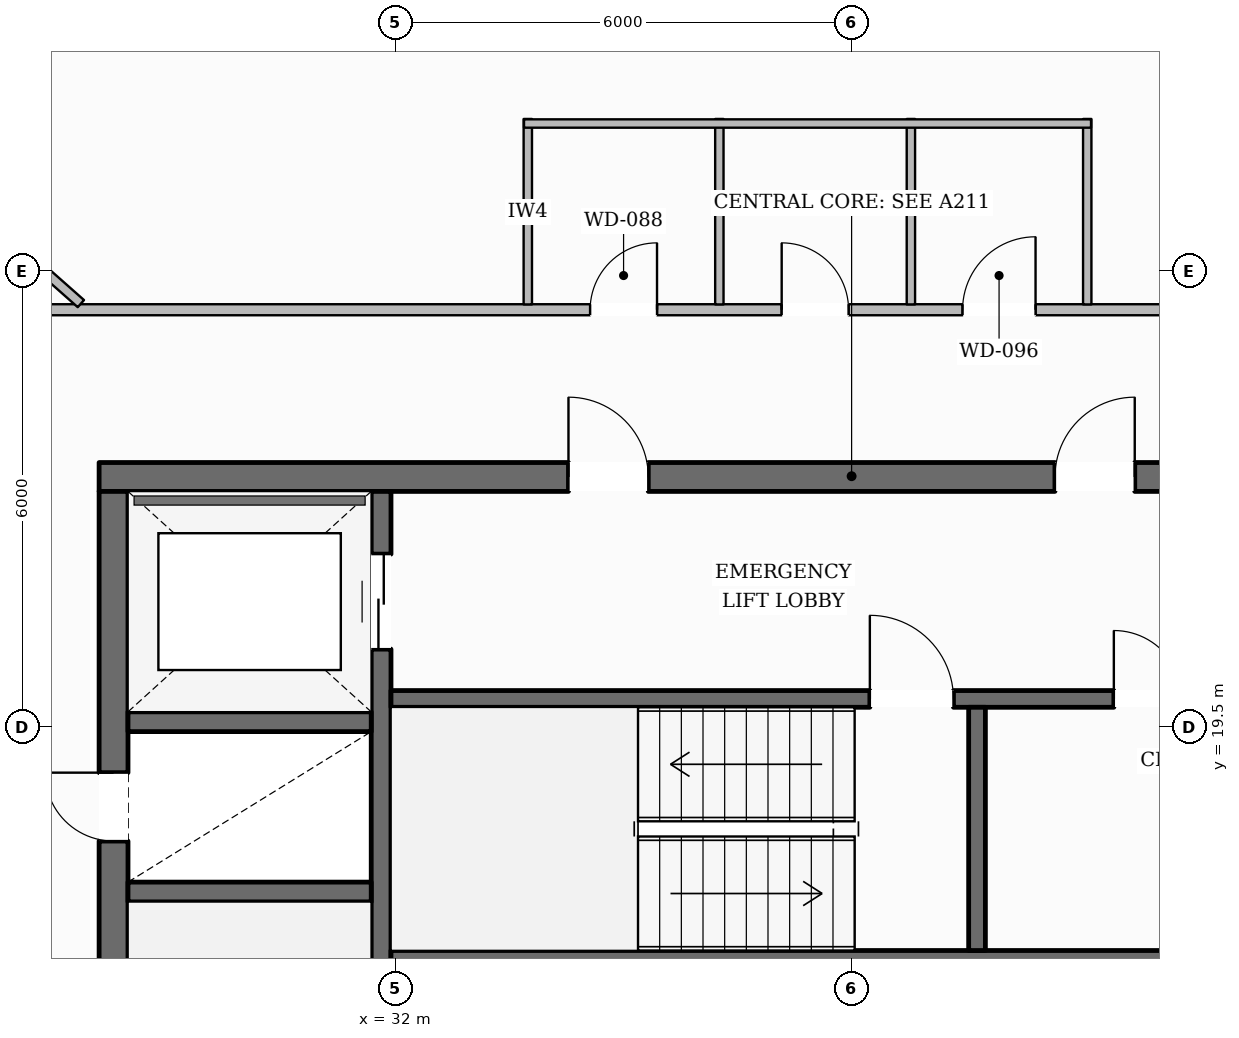
"""IFC4 building model, lengths in metres.
Left out: names, types, materials, properties, quantities, classifications, styles, units other than length and angle.
Written with IfcOpenShell. Run it as: python <this file> out.ifc"""

import sys

from ifc_helpers import new_model, si_unit, direction, frame, frame_2d, origin, place, context, subcontext, project, spatial, rectangle, extrude, element, fill, save


model = new_model("IFC4")
c1 = context("Model", 3, precision=1e-05, world=origin(), true_north=direction((0.0, 1.0)))
c2 = subcontext(c1, "Body", "Model", "MODEL_VIEW")
j1 = project(units=[si_unit("LENGTHUNIT", "METRE"), si_unit("PLANEANGLEUNIT", "RADIAN")], contexts=[c1])
p1 = place(None, origin())
s1 = spatial("IfcSite", under=j1, at=p1, CompositionType="ELEMENT")
p2 = place(p1, origin())
s2 = spatial("IfcBuilding", under=s1, at=p2, CompositionType="ELEMENT")
p3 = place(p2, frame((0.0, 0.0, 293.4)))
s3 = spatial("IfcBuildingStorey", under=s2, at=p3, CompositionType="ELEMENT", Elevation=293.4)
p4 = place(p3, frame((28.1, 22.79, 0.0), z_axis=(0.0, 0.0, 1.0), x_axis=(1.0, 0.0, 0.0)))
e1 = element("IfcWall", 1, at=p4, inside=s3, PredefinedType="SOLIDWALL", context=c2, shape_type="SweptSolid", body=[
    extrude(rectangle(XDim=19.8, YDim=0.38, at=frame_2d((9.9, 0.0))), origin(), (0.0, 0.0, 1.0), 3.61),
])
p5 = place(p4, frame((6.175, 0.0, 0.0)))
e2 = element("IfcOpeningElement", 2, at=p5, cuts=e1, PredefinedType="OPENING", context=c2, shape_type="SweptSolid", body=[
    extrude(rectangle(XDim=1.05, YDim=2.15, at=frame_2d((0.525, 1.075))), frame((0.0, 0.2, 0.0), z_axis=(0.0, -1.0, 0.0), x_axis=(1.0, 0.0, 0.0)), (0.0, 0.0, 1.0), 0.4),
])
p6 = place(p4, frame((12.575, 0.0, 0.0)))
e3 = element("IfcOpeningElement", 3, at=p6, cuts=e1, PredefinedType="OPENING", context=c2, shape_type="SweptSolid", body=[
    extrude(rectangle(XDim=1.05, YDim=2.15, at=frame_2d((0.525, 1.075))), frame((0.0, 0.2, 0.0), z_axis=(0.0, -1.0, 0.0), x_axis=(1.0, 0.0, 0.0)), (0.0, 0.0, 1.0), 0.4),
])
p7 = place(p3, frame((28.29, 9.6, 0.0), z_axis=(0.0, 0.0, 1.0), x_axis=(0.0, 1.0, 0.0)))
e4 = element("IfcWall", 4, at=p7, inside=s3, PredefinedType="SOLIDWALL", context=c2, shape_type="SweptSolid", body=[
    extrude(rectangle(XDim=13.0, YDim=0.38, at=frame_2d((6.5, 0.0))), origin(), (0.0, 0.0, 1.0), 3.61),
])
p8 = place(p7, frame((0.2, 0.0, 0.0)))
e5 = element("IfcOpeningElement", 5, at=p8, cuts=e4, PredefinedType="OPENING", context=c2, shape_type="SweptSolid", body=[
    extrude(rectangle(XDim=1.1, YDim=2.15, at=frame_2d((0.55, 1.075))), frame((0.0, 0.2, 0.0), z_axis=(0.0, -1.0, 0.0), x_axis=(1.0, 0.0, 0.0)), (0.0, 0.0, 1.0), 0.4),
])
p9 = place(p7, frame((8.4, 0.0, 0.0)))
e6 = element("IfcOpeningElement", 6, at=p9, cuts=e4, PredefinedType="OPENING", context=c2, shape_type="SweptSolid", body=[
    extrude(rectangle(XDim=0.9, YDim=2.1, at=frame_2d((0.45, 1.05))), frame((0.0, 0.2, 0.0), z_axis=(0.0, -1.0, 0.0), x_axis=(1.0, 0.0, 0.0)), (0.0, 0.0, 1.0), 0.4),
])
p10 = place(p3, frame((31.81, 9.6, 0.0), z_axis=(0.0, 0.0, 1.0), x_axis=(0.0, 1.0, 0.0)))
e7 = element("IfcWall", 7, at=p10, inside=s3, PredefinedType="SHEAR", context=c2, shape_type="SweptSolid", body=[
    extrude(rectangle(XDim=13.0, YDim=0.26, at=frame_2d((6.5, 0.0))), origin(), (0.0, 0.0, 1.0), 3.61),
])
p11 = place(p10, frame((10.925, 0.0, 0.0)))
e8 = element("IfcOpeningElement", 8, at=p11, cuts=e7, PredefinedType="OPENING", context=c2, shape_type="SweptSolid", body=[
    extrude(rectangle(XDim=1.25, YDim=2.25, at=frame_2d((0.625, 1.125))), frame((0.0, 0.14, 0.0), z_axis=(0.0, -1.0, 0.0), x_axis=(1.0, 0.0, 0.0)), (0.0, 0.0, 1.0), 0.28),
])
for number, where, z_axis, x_axis in (
    (9, (28.48, 17.33, 0.0), (0.0, 0.0, 1.0), (1.0, 0.0, 0.0)),
    (10, (28.48, 19.57, 0.0), (0.0, 0.0, 1.0), (1.0, 0.0, 0.0)),
):
    element("IfcWall", number, at=place(p3, frame(where, z_axis=z_axis, x_axis=x_axis)), inside=s3, PredefinedType="SHEAR", context=c2, shape_type="SweptSolid", body=[
        extrude(rectangle(XDim=3.2, YDim=0.26, at=frame_2d((1.6, 0.0))), origin(), (0.0, 0.0, 1.0), 3.61),
    ])
p12 = place(p3, frame((31.94, 19.87, 0.0), z_axis=(0.0, 0.0, 1.0), x_axis=(1.0, 0.0, 0.0)))
e11 = element("IfcWall", 11, at=p12, inside=s3, PredefinedType="SOLIDWALL", context=c2, shape_type="SweptSolid", body=[
    extrude(rectangle(XDim=12.12, YDim=0.22, at=frame_2d((6.06, 0.0))), origin(), (0.0, 0.0, 1.0), 3.61),
])
p13 = place(p12, frame((6.3, 0.0, 0.0)))
e12 = element("IfcOpeningElement", 12, at=p13, cuts=e11, PredefinedType="OPENING", context=c2, shape_type="SweptSolid", body=[
    extrude(rectangle(XDim=1.1, YDim=2.15, at=frame_2d((0.55, 1.075))), frame((0.0, 0.12, 0.0), z_axis=(0.0, -1.0, 0.0), x_axis=(1.0, 0.0, 0.0)), (0.0, 0.0, 1.0), 0.24),
])
p14 = place(p12, frame((9.51, 0.0, 0.0)))
e13 = element("IfcOpeningElement", 13, at=p14, cuts=e11, PredefinedType="OPENING", context=c2, shape_type="SweptSolid", body=[
    extrude(rectangle(XDim=0.9, YDim=2.1, at=frame_2d((0.45, 1.05))), frame((0.0, 0.12, 0.0), z_axis=(0.0, -1.0, 0.0), x_axis=(1.0, 0.0, 0.0)), (0.0, 0.0, 1.0), 0.24),
])
p15 = place(p3, frame((31.94, 16.45, 0.0), z_axis=(0.0, 0.0, 1.0), x_axis=(1.0, 0.0, 0.0)))
e14 = element("IfcWall", 14, at=p15, inside=s3, PredefinedType="SOLIDWALL", context=c2, shape_type="SweptSolid", body=[
    extrude(rectangle(XDim=12.12, YDim=0.22, at=frame_2d((6.06, 0.0))), origin(), (0.0, 0.0, 1.0), 3.61),
])
p16 = place(p3, frame((39.65, 16.56, 0.0), z_axis=(0.0, 0.0, 1.0), x_axis=(0.0, 1.0, 0.0)))
e15 = element("IfcWall", 15, at=p16, inside=s3, PredefinedType="SOLIDWALL", context=c2, shape_type="SweptSolid", body=[
    extrude(rectangle(XDim=3.2, YDim=0.22, at=frame_2d((1.6, 0.0))), origin(), (0.0, 0.0, 1.0), 3.61),
])
p17 = place(p3, frame((15.381, 10.05, 0.0), z_axis=(0.0, 0.0, 1.0), x_axis=(0.501350047618, 0.865244549104, 0.0)))
e16 = element("IfcWall", 16, at=p17, inside=s3, PredefinedType="STANDARD", context=c2, shape_type="SweptSolid", body=[
    extrude(rectangle(XDim=39.715, YDim=0.35, at=frame_2d((19.857, 0.0))), origin(), (0.0, 0.0, 1.0), 3.196),
])
p18 = place(p17, frame((9.529, 0.0, 0.0)))
e17 = element("IfcOpeningElement", 17, at=p18, cuts=e16, PredefinedType="OPENING", context=c2, shape_type="SweptSolid", body=[
    extrude(rectangle(XDim=1.0, YDim=2.2, at=frame_2d((0.5, 1.1))), frame((0.0, 0.185, 0.0), z_axis=(0.0, -1.0, 0.0), x_axis=(1.0, 0.0, 0.0)), (0.0, 0.0, 1.0), 0.37),
])
p19 = place(p17, frame((35.336, 0.0, 0.65)))
e18 = element("IfcOpeningElement", 18, at=p19, cuts=e16, PredefinedType="OPENING", context=c2, shape_type="SweptSolid", body=[
    extrude(rectangle(XDim=1.35, YDim=1.75, at=frame_2d((0.675, 0.875))), frame((0.0, 0.185, 0.0), z_axis=(0.0, -1.0, 0.0), x_axis=(1.0, 0.0, 0.0)), (0.0, 0.0, 1.0), 0.37),
])
p20 = place(p17, frame((28.875, 0.0, 0.65)))
e19 = element("IfcOpeningElement", 19, at=p20, cuts=e16, PredefinedType="OPENING", context=c2, shape_type="SweptSolid", body=[
    extrude(rectangle(XDim=1.35, YDim=1.75, at=frame_2d((0.675, 0.875))), frame((0.0, 0.185, 0.0), z_axis=(0.0, -1.0, 0.0), x_axis=(1.0, 0.0, 0.0)), (0.0, 0.0, 1.0), 0.37),
])
p21 = place(p17, frame((22.414, 0.0, 0.65)))
e20 = element("IfcOpeningElement", 20, at=p21, cuts=e16, PredefinedType="OPENING", context=c2, shape_type="SweptSolid", body=[
    extrude(rectangle(XDim=1.35, YDim=1.75, at=frame_2d((0.675, 0.875))), frame((0.0, 0.185, 0.0), z_axis=(0.0, -1.0, 0.0), x_axis=(1.0, 0.0, 0.0)), (0.0, 0.0, 1.0), 0.37),
])
p22 = place(p17, frame((3.03, 0.0, 0.65)))
e21 = element("IfcOpeningElement", 21, at=p22, cuts=e16, PredefinedType="OPENING", context=c2, shape_type="SweptSolid", body=[
    extrude(rectangle(XDim=1.35, YDim=1.75, at=frame_2d((0.675, 0.875))), frame((0.0, 0.185, 0.0), z_axis=(0.0, -1.0, 0.0), x_axis=(1.0, 0.0, 0.0)), (0.0, 0.0, 1.0), 0.37),
])
p23 = place(p3, frame((40.595, 44.482, 0.0), z_axis=(0.0, 0.0, 1.0), x_axis=(0.491607932601, -0.870816651543, 0.0)))
e22 = element("IfcWall", 22, at=p23, inside=s3, PredefinedType="STANDARD", context=c2, shape_type="SweptSolid", body=[
    extrude(rectangle(XDim=38.965, YDim=0.35, at=frame_2d((19.482, 0.0))), origin(), (0.0, 0.0, 1.0), 3.196),
])
p24 = place(p23, frame((9.341, 0.0, 0.0)))
e23 = element("IfcOpeningElement", 23, at=p24, cuts=e22, PredefinedType="OPENING", context=c2, shape_type="SweptSolid", body=[
    extrude(rectangle(XDim=1.0, YDim=2.2, at=frame_2d((0.5, 1.1))), frame((0.0, 0.185, 0.0), z_axis=(0.0, -1.0, 0.0), x_axis=(1.0, 0.0, 0.0)), (0.0, 0.0, 1.0), 0.37),
])
p25 = place(p23, frame((34.648, 0.0, 0.65)))
e24 = element("IfcOpeningElement", 24, at=p25, cuts=e22, PredefinedType="OPENING", context=c2, shape_type="SweptSolid", body=[
    extrude(rectangle(XDim=1.35, YDim=1.75, at=frame_2d((0.675, 0.875))), frame((0.0, 0.185, 0.0), z_axis=(0.0, -1.0, 0.0), x_axis=(1.0, 0.0, 0.0)), (0.0, 0.0, 1.0), 0.37),
])
p26 = place(p23, frame((28.314, 0.0, 0.65)))
e25 = element("IfcOpeningElement", 25, at=p26, cuts=e22, PredefinedType="OPENING", context=c2, shape_type="SweptSolid", body=[
    extrude(rectangle(XDim=1.35, YDim=1.75, at=frame_2d((0.675, 0.875))), frame((0.0, 0.185, 0.0), z_axis=(0.0, -1.0, 0.0), x_axis=(1.0, 0.0, 0.0)), (0.0, 0.0, 1.0), 0.37),
])
p27 = place(p23, frame((21.979, 0.0, 0.65)))
e26 = element("IfcOpeningElement", 26, at=p27, cuts=e22, PredefinedType="OPENING", context=c2, shape_type="SweptSolid", body=[
    extrude(rectangle(XDim=1.35, YDim=1.75, at=frame_2d((0.675, 0.875))), frame((0.0, 0.185, 0.0), z_axis=(0.0, -1.0, 0.0), x_axis=(1.0, 0.0, 0.0)), (0.0, 0.0, 1.0), 0.37),
])
p28 = place(p23, frame((2.976, 0.0, 0.65)))
e27 = element("IfcOpeningElement", 27, at=p28, cuts=e22, PredefinedType="OPENING", context=c2, shape_type="SweptSolid", body=[
    extrude(rectangle(XDim=1.35, YDim=1.75, at=frame_2d((0.675, 0.875))), frame((0.0, 0.185, 0.0), z_axis=(0.0, -1.0, 0.0), x_axis=(1.0, 0.0, 0.0)), (0.0, 0.0, 1.0), 0.37),
])
p29 = place(p3, frame((26.09, 24.99, 0.0), z_axis=(0.0, 0.0, 1.0), x_axis=(1.0, 0.0, 0.0)))
e28 = element("IfcWall", 28, at=p29, inside=s3, PredefinedType="PARTITIONING", context=c2, shape_type="SweptSolid", body=[
    extrude(rectangle(XDim=17.11, YDim=0.145, at=frame_2d((8.555, 0.0))), origin(), (0.0, 0.0, 1.0), 3.61),
])
p30 = place(p29, frame((8.47, 0.0, 0.0)))
e29 = element("IfcOpeningElement", 29, at=p30, cuts=e28, PredefinedType="OPENING", context=c2, shape_type="SweptSolid", body=[
    extrude(rectangle(XDim=0.88, YDim=2.1, at=frame_2d((0.44, 1.05))), frame((0.0, 0.083, 0.0), z_axis=(0.0, -1.0, 0.0), x_axis=(1.0, 0.0, 0.0)), (0.0, 0.0, 1.0), 0.165),
])
p31 = place(p29, frame((10.99, 0.0, 0.0)))
e30 = element("IfcOpeningElement", 30, at=p31, cuts=e28, PredefinedType="OPENING", context=c2, shape_type="SweptSolid", body=[
    extrude(rectangle(XDim=0.88, YDim=2.1, at=frame_2d((0.44, 1.05))), frame((0.0, 0.083, 0.0), z_axis=(0.0, -1.0, 0.0), x_axis=(1.0, 0.0, 0.0)), (0.0, 0.0, 1.0), 0.165),
])
p32 = place(p29, frame((13.37, 0.0, 0.0)))
e31 = element("IfcOpeningElement", 31, at=p32, cuts=e28, PredefinedType="OPENING", context=c2, shape_type="SweptSolid", body=[
    extrude(rectangle(XDim=0.96, YDim=2.1, at=frame_2d((0.48, 1.05))), frame((0.0, 0.083, 0.0), z_axis=(0.0, -1.0, 0.0), x_axis=(1.0, 0.0, 0.0)), (0.0, 0.0, 1.0), 0.165),
])
for number, where, z_axis, x_axis in (
    (32, (33.74, 25.06, 0.0), (0.0, 0.0, 1.0), (0.0, 1.0, 0.0)),
    (33, (36.26, 25.06, 0.0), (0.0, 0.0, 1.0), (0.0, 1.0, 0.0)),
    (34, (38.78, 25.06, 0.0), (0.0, 0.0, 1.0), (0.0, 1.0, 0.0)),
    (35, (41.1, 25.06, 0.0), (0.0, 0.0, 1.0), (0.0, 1.0, 0.0)),
):
    element("IfcWall", number, at=place(p3, frame(where, z_axis=z_axis, x_axis=x_axis)), inside=s3, PredefinedType="PLUMBINGWALL", context=c2, shape_type="SweptSolid", body=[
        extrude(rectangle(XDim=2.44, YDim=0.11, at=frame_2d((1.22, 0.0))), origin(), (0.0, 0.0, 1.0), 3.61),
    ])
p33 = place(p3, frame((33.69, 27.44, 0.0), z_axis=(0.0, 0.0, 1.0), x_axis=(1.0, 0.0, 0.0)))
e36 = element("IfcWall", 36, at=p33, inside=s3, PredefinedType="PLUMBINGWALL", context=c2, shape_type="SweptSolid", body=[
    extrude(rectangle(XDim=7.46, YDim=0.11, at=frame_2d((3.73, 0.0))), origin(), (0.0, 0.0, 1.0), 3.61),
])
p34 = place(p3, frame((27.86, 25.071, 0.0), z_axis=(0.0, 0.0, 1.0), x_axis=(-0.748944260639, 0.662633001333, 0.0)))
e37 = element("IfcWall", 37, at=p34, inside=s3, PredefinedType="PARTITIONING", context=c2, shape_type="SweptSolid", body=[
    extrude(rectangle(XDim=2.673, YDim=0.125, at=frame_2d((1.336, 0.0))), origin(), (0.0, 0.0, 1.0), 3.61),
])
p35 = place(p13, origin())
e38 = element("IfcDoor", 38, at=p35, inside=s3, OperationType="SINGLE_SWING_LEFT", PredefinedType="DOOR", context=c2, shape_type="SweptSolid", body=[
    extrude(rectangle(XDim=1.1, YDim=2.15, at=frame_2d((0.55, 1.075))), frame((0.0, 0.025, 0.0), z_axis=(0.0, -1.0, 0.0), x_axis=(1.0, 0.0, 0.0)), (0.0, 0.0, 1.0), 0.05),
])
fill(e12, e38)
p36 = place(p9, origin())
e39 = element("IfcDoor", 39, at=p36, inside=s3, OperationType="SINGLE_SWING_RIGHT", PredefinedType="DOOR", context=c2, shape_type="SweptSolid", body=[
    extrude(rectangle(XDim=0.9, YDim=2.1, at=frame_2d((0.45, 1.05))), frame((0.0, 0.025, 0.0), z_axis=(0.0, -1.0, 0.0), x_axis=(1.0, 0.0, 0.0)), (0.0, 0.0, 1.0), 0.05),
])
fill(e6, e39)
p37 = place(p5, origin())
e40 = element("IfcDoor", 40, at=p37, inside=s3, OperationType="SINGLE_SWING_LEFT", PredefinedType="DOOR", context=c2, shape_type="SweptSolid", body=[
    extrude(rectangle(XDim=1.05, YDim=2.15, at=frame_2d((0.525, 1.075))), frame((0.0, 0.025, 0.0), z_axis=(0.0, -1.0, 0.0), x_axis=(1.0, 0.0, 0.0)), (0.0, 0.0, 1.0), 0.05),
])
fill(e2, e40)
p38 = place(p6, origin())
e41 = element("IfcDoor", 41, at=p38, inside=s3, OperationType="SINGLE_SWING_RIGHT", PredefinedType="DOOR", context=c2, shape_type="SweptSolid", body=[
    extrude(rectangle(XDim=1.05, YDim=2.15, at=frame_2d((0.525, 1.075))), frame((0.0, 0.025, 0.0), z_axis=(0.0, -1.0, 0.0), x_axis=(1.0, 0.0, 0.0)), (0.0, 0.0, 1.0), 0.05),
])
fill(e3, e41)
p39 = place(p11, origin())
e42 = element("IfcDoor", 42, at=p39, inside=s3, OperationType="DOUBLE_DOOR_SLIDING", PredefinedType="DOOR", context=c2, shape_type="SweptSolid", body=[
    extrude(rectangle(XDim=1.25, YDim=2.25, at=frame_2d((0.625, 1.125))), frame((0.0, 0.025, 0.0), z_axis=(0.0, -1.0, 0.0), x_axis=(1.0, 0.0, 0.0)), (0.0, 0.0, 1.0), 0.05),
])
fill(e8, e42)
p40 = place(p14, origin())
e43 = element("IfcDoor", 43, at=p40, inside=s3, OperationType="SINGLE_SWING_LEFT", PredefinedType="DOOR", context=c2, shape_type="SweptSolid", body=[
    extrude(rectangle(XDim=0.9, YDim=2.1, at=frame_2d((0.45, 1.05))), frame((0.0, 0.025, 0.0), z_axis=(0.0, -1.0, 0.0), x_axis=(1.0, 0.0, 0.0)), (0.0, 0.0, 1.0), 0.05),
])
fill(e13, e43)
p41 = place(p30, origin())
e44 = element("IfcDoor", 44, at=p41, inside=s3, OperationType="SINGLE_SWING_RIGHT", PredefinedType="DOOR", context=c2, shape_type="SweptSolid", body=[
    extrude(rectangle(XDim=0.88, YDim=2.1, at=frame_2d((0.44, 1.05))), frame((0.0, 0.025, 0.0), z_axis=(0.0, -1.0, 0.0), x_axis=(1.0, 0.0, 0.0)), (0.0, 0.0, 1.0), 0.05),
])
fill(e29, e44)
p42 = place(p31, origin())
e45 = element("IfcDoor", 45, at=p42, inside=s3, OperationType="SINGLE_SWING_LEFT", PredefinedType="DOOR", context=c2, shape_type="SweptSolid", body=[
    extrude(rectangle(XDim=0.88, YDim=2.1, at=frame_2d((0.44, 1.05))), frame((0.0, 0.025, 0.0), z_axis=(0.0, -1.0, 0.0), x_axis=(1.0, 0.0, 0.0)), (0.0, 0.0, 1.0), 0.05),
])
fill(e30, e45)
p43 = place(p32, origin())
e46 = element("IfcDoor", 46, at=p43, inside=s3, OperationType="SINGLE_SWING_RIGHT", PredefinedType="DOOR", context=c2, shape_type="SweptSolid", body=[
    extrude(rectangle(XDim=0.96, YDim=2.1, at=frame_2d((0.48, 1.05))), frame((0.0, 0.025, 0.0), z_axis=(0.0, -1.0, 0.0), x_axis=(1.0, 0.0, 0.0)), (0.0, 0.0, 1.0), 0.05),
])
fill(e31, e46)
save(model, sys.argv[1])
